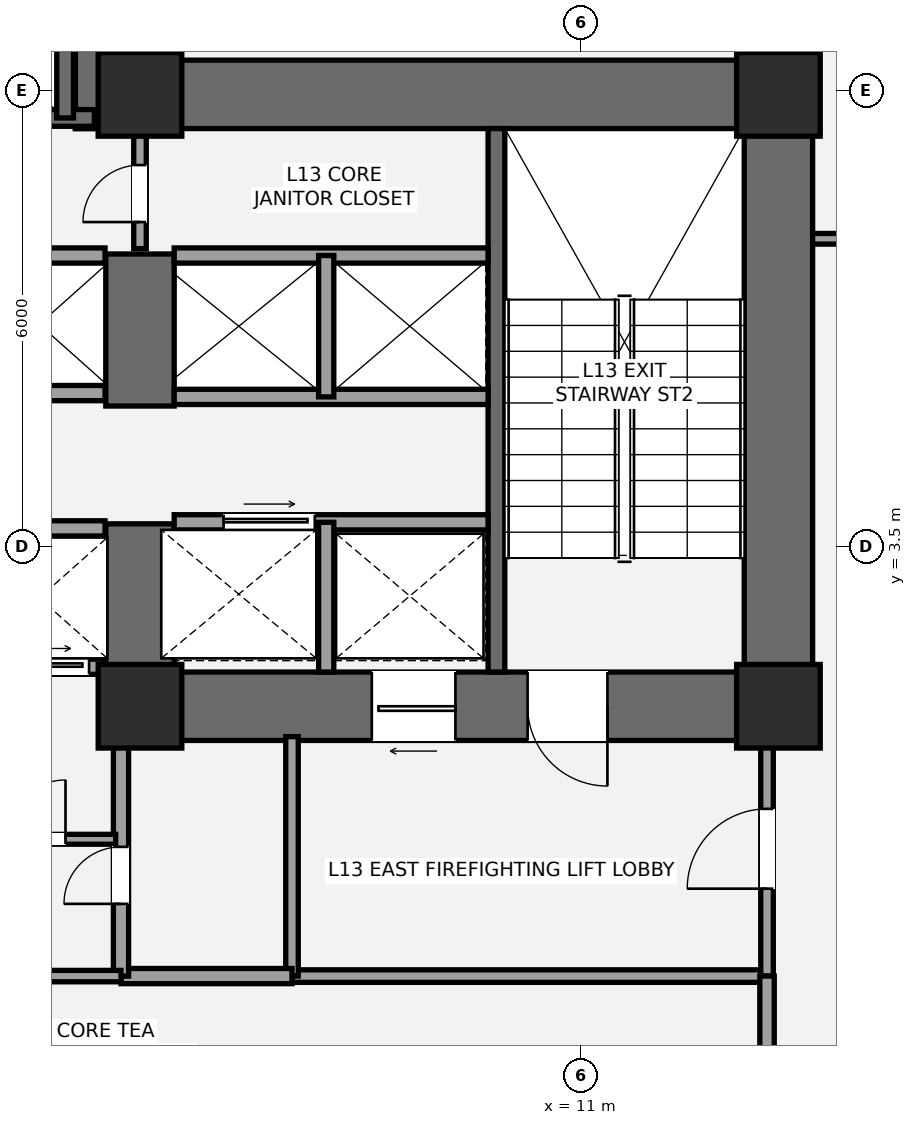
"""IFC4 building model, lengths in metres.
Left out: names, types, materials, properties, quantities, classifications, styles, units other than length and angle.
Written with IfcOpenShell. Run it as: python <this file> out.ifc"""

import sys

from ifc_helpers import new_model, si_unit, direction, frame, frame_2d, origin, origin_2d, place, context, subcontext, project, spatial, rectangle, extrude, element, fill, save


model = new_model("IFC4")
c1 = context("Model", 3, precision=1e-05, world=origin(), true_north=direction((0.0, 1.0)))
c2 = subcontext(c1, "Body", "Model", "MODEL_VIEW")
j1 = project(units=[si_unit("LENGTHUNIT", "METRE"), si_unit("PLANEANGLEUNIT", "RADIAN")], contexts=[c1])
p1 = place(None, origin())
s1 = spatial("IfcSite", under=j1, at=p1, CompositionType="ELEMENT")
p2 = place(p1, origin())
s2 = spatial("IfcBuilding", under=s1, at=p2, CompositionType="ELEMENT")
p3 = place(p2, frame((0.0, 0.0, 52.2)))
s3 = spatial("IfcBuildingStorey", under=s2, at=p3, CompositionType="ELEMENT", Elevation=52.2)
p4 = place(p3, frame((13.6, 0.95, 0.0), z_axis=(0.0, 0.0, 1.0), x_axis=(0.0, 1.0, 0.0)))
e1 = element("IfcWall", 1, at=p4, inside=s3, PredefinedType="SHEAR", context=c2, shape_type="SweptSolid", body=[
    extrude(rectangle(XDim=8.95, YDim=0.9, at=frame_2d((4.475, 0.0))), origin(), (0.0, 0.0, 1.0), 3.6),
])
p5 = place(p3, frame((4.35, 9.45, 0.0), z_axis=(0.0, 0.0, 1.0), x_axis=(1.0, 0.0, 0.0)))
e2 = element("IfcWall", 2, at=p5, inside=s3, PredefinedType="SHEAR", context=c2, shape_type="SweptSolid", body=[
    extrude(rectangle(XDim=9.7, YDim=0.9, at=frame_2d((4.85, 0.0))), origin(), (0.0, 0.0, 1.0), 3.6),
])
p6 = place(p3, frame((14.05, 1.4, 0.0), z_axis=(0.0, 0.0, 1.0), x_axis=(-1.0, 0.0, 0.0)))
e3 = element("IfcWall", 3, at=p6, inside=s3, PredefinedType="SHEAR", context=c2, shape_type="SweptSolid", body=[
    extrude(rectangle(XDim=9.3, YDim=0.9, at=frame_2d((4.65, 0.0))), origin(), (0.0, 0.0, 1.0), 3.6),
])
p7 = place(p6, frame((2.7, 0.0, 0.0)))
e4 = element("IfcOpeningElement", 4, at=p7, cuts=e3, PredefinedType="OPENING", context=c2, shape_type="SweptSolid", body=[
    extrude(rectangle(XDim=1.05, YDim=2.15, at=frame_2d((0.525, 1.075))), frame((0.0, 0.46, 0.0), z_axis=(0.0, -1.0, 0.0), x_axis=(1.0, 0.0, 0.0)), (0.0, 0.0, 1.0), 0.92),
])
p8 = place(p6, frame((4.7, 0.0, 0.0)))
e5 = element("IfcOpeningElement", 5, at=p8, cuts=e3, PredefinedType="OPENING", context=c2, shape_type="SweptSolid", body=[
    extrude(rectangle(XDim=1.1, YDim=2.2, at=frame_2d((0.55, 1.1))), frame((0.0, 0.46, 0.0), z_axis=(0.0, -1.0, 0.0), x_axis=(1.0, 0.0, 0.0)), (0.0, 0.0, 1.0), 0.92),
])
p9 = place(p3, frame((5.2, 0.95, 0.0), z_axis=(0.0, 0.0, 1.0), x_axis=(0.0, 1.0, 0.0)))
e6 = element("IfcWall", 6, at=p9, inside=s3, PredefinedType="SHEAR", context=c2, shape_type="SweptSolid", body=[
    extrude(rectangle(XDim=2.85, YDim=0.9, at=frame_2d((1.425, 0.0))), origin(), (0.0, 0.0, 1.0), 3.6),
])
p10 = place(p3, frame((5.2, 5.35, 0.0), z_axis=(0.0, 0.0, 1.0), x_axis=(0.0, 1.0, 0.0)))
e7 = element("IfcWall", 7, at=p10, inside=s3, PredefinedType="SHEAR", context=c2, shape_type="SweptSolid", body=[
    extrude(rectangle(XDim=2.0, YDim=0.9, at=frame_2d((1.0, 0.0))), origin(), (0.0, 0.0, 1.0), 3.6),
])
p11 = place(p3, frame((9.89, 1.85, 0.0), z_axis=(0.0, 0.0, 1.0), x_axis=(0.0, 1.0, 0.0)))
e8 = element("IfcWall", 8, at=p11, inside=s3, PredefinedType="SHEAR", context=c2, shape_type="SweptSolid", body=[
    extrude(rectangle(XDim=7.15, YDim=0.22, at=frame_2d((3.575, 0.0))), origin(), (0.0, 0.0, 1.0), 3.6),
])
p12 = place(p3, frame((4.8, 9.0, 0.0), z_axis=(0.0, 0.0, 1.0), x_axis=(0.0, 1.0, 0.0)))
e9 = element("IfcWall", 9, at=p12, inside=s3, PredefinedType="SHEAR", context=c2, shape_type="SweptSolid", body=[
    extrude(rectangle(XDim=4.3, YDim=0.9, at=frame_2d((2.15, 0.0))), origin(), (0.0, 0.0, 1.0), 3.6),
])
p13 = place(p3, frame((-4.7, 9.14, 0.0), z_axis=(0.0, 0.0, 1.0), x_axis=(1.0, 0.0, 0.0)))
e10 = element("IfcWall", 10, at=p13, inside=s3, PredefinedType="SHEAR", context=c2, shape_type="SweptSolid", body=[
    extrude(rectangle(XDim=9.3, YDim=0.22, at=frame_2d((4.65, 0.0))), origin(), (0.0, 0.0, 1.0), 3.6),
])
p14 = place(p13, frame((1.15, 0.0, 0.0)))
e11 = element("IfcOpeningElement", 11, at=p14, cuts=e10, PredefinedType="OPENING", context=c2, shape_type="SweptSolid", body=[
    extrude(rectangle(XDim=1.05, YDim=2.15, at=frame_2d((0.525, 1.075))), frame((0.0, 0.12, 0.0), z_axis=(0.0, -1.0, 0.0), x_axis=(1.0, 0.0, 0.0)), (0.0, 0.0, 1.0), 0.24),
])
p15 = place(p3, frame((4.215, 9.14, 0.0), z_axis=(0.0, 0.0, 1.0), x_axis=(0.0, 1.0, 0.0)))
e12 = element("IfcWall", 12, at=p15, inside=s3, PredefinedType="SHEAR", context=c2, shape_type="SweptSolid", body=[
    extrude(rectangle(XDim=3.26, YDim=0.22, at=frame_2d((1.63, 0.0))), origin(), (0.0, 0.0, 1.0), 3.6),
])
for number, where, z_axis, x_axis in (
    (13, (5.2, 1.4, 0.0), (0.0, 0.0, 1.0), (1.0, 0.0, 0.0)),
    (14, (5.2, 9.45, 0.0), (0.0, 0.0, 1.0), (1.0, 0.0, 0.0)),
    (15, (13.6, 1.4, 0.0), (0.0, 0.0, 1.0), (1.0, 0.0, 0.0)),
    (16, (13.6, 9.45, 0.0), (0.0, 0.0, 1.0), (1.0, 0.0, 0.0)),
):
    element("IfcColumn", number, at=place(p3, frame(where, z_axis=z_axis, x_axis=x_axis)), inside=s3, PredefinedType="COLUMN", context=c2, shape_type="SweptSolid", body=[
        extrude(rectangle(XDim=1.1, YDim=1.1, at=origin_2d()), origin(), (0.0, 0.0, 1.0), 3.6),
    ])
p16 = place(p3, frame((7.2, -2.15, 0.0), z_axis=(0.0, 0.0, 1.0), x_axis=(1.0, 0.0, 0.0)))
e17 = element("IfcWall", 17, at=p16, inside=s3, PredefinedType="PARTITIONING", context=c2, shape_type="SweptSolid", body=[
    extrude(rectangle(XDim=6.25, YDim=0.165, at=frame_2d((3.125, 0.0))), origin(), (0.0, 0.0, 1.0), 3.4),
])
p17 = place(p3, frame((7.2, -2.15, 0.0), z_axis=(0.0, 0.0, 1.0), x_axis=(0.0, 1.0, 0.0)))
e18 = element("IfcWall", 18, at=p17, inside=s3, PredefinedType="PARTITIONING", context=c2, shape_type="SweptSolid", body=[
    extrude(rectangle(XDim=3.15, YDim=0.165, at=frame_2d((1.575, 0.0))), origin(), (0.0, 0.0, 1.0), 2.853),
])
p18 = place(p3, frame((13.45, -2.15, 0.0), z_axis=(0.0, 0.0, 1.0), x_axis=(0.0, 1.0, 0.0)))
e19 = element("IfcWall", 19, at=p18, inside=s3, PredefinedType="PARTITIONING", context=c2, shape_type="SweptSolid", body=[
    extrude(rectangle(XDim=3.15, YDim=0.165, at=frame_2d((1.575, 0.0))), origin(), (0.0, 0.0, 1.0), 2.853),
])
p19 = place(p18, frame((1.15, 0.0, 0.0)))
e20 = element("IfcOpeningElement", 20, at=p19, cuts=e19, PredefinedType="OPENING", context=c2, shape_type="SweptSolid", body=[
    extrude(rectangle(XDim=1.05, YDim=2.15, at=frame_2d((0.525, 1.075))), frame((0.0, 0.093, 0.0), z_axis=(0.0, -1.0, 0.0), x_axis=(1.0, 0.0, 0.0)), (0.0, 0.0, 1.0), 0.185),
])
p20 = place(p3, frame((4.95, -2.15, 0.0), z_axis=(0.0, 0.0, 1.0), x_axis=(1.0, 0.0, 0.0)))
e21 = element("IfcWall", 21, at=p20, inside=s3, PredefinedType="SOLIDWALL", context=c2, shape_type="SweptSolid", body=[
    extrude(rectangle(XDim=2.25, YDim=0.2, at=frame_2d((1.125, 0.0))), origin(), (0.0, 0.0, 1.0), 3.4),
])
p21 = place(p3, frame((4.95, -2.15, 0.0), z_axis=(0.0, 0.0, 1.0), x_axis=(0.0, 1.0, 0.0)))
e22 = element("IfcWall", 22, at=p21, inside=s3, PredefinedType="SOLIDWALL", context=c2, shape_type="SweptSolid", body=[
    extrude(rectangle(XDim=3.15, YDim=0.2, at=frame_2d((1.575, 0.0))), origin(), (0.0, 0.0, 1.0), 2.853),
])
p22 = place(p21, frame((0.95, 0.0, 0.0)))
e23 = element("IfcOpeningElement", 23, at=p22, cuts=e22, PredefinedType="OPENING", context=c2, shape_type="SweptSolid", body=[
    extrude(rectangle(XDim=0.75, YDim=2.1, at=frame_2d((0.375, 1.05))), frame((0.0, 0.11, 0.0), z_axis=(0.0, -1.0, 0.0), x_axis=(1.0, 0.0, 0.0)), (0.0, 0.0, 1.0), 0.22),
])
p23 = place(p3, frame((2.89, -0.35, 0.0), z_axis=(0.0, 0.0, 1.0), x_axis=(1.0, 0.0, 0.0)))
e24 = element("IfcWall", 24, at=p23, inside=s3, PredefinedType="PARTITIONING", context=c2, shape_type="SweptSolid", body=[
    extrude(rectangle(XDim=1.99, YDim=0.13, at=frame_2d((0.995, 0.0))), origin(), (0.0, 0.0, 1.0), 3.4),
])
p24 = place(p23, frame((0.55, 0.0, 0.0)))
e25 = element("IfcOpeningElement", 25, at=p24, cuts=e24, PredefinedType="OPENING", context=c2, shape_type="SweptSolid", body=[
    extrude(rectangle(XDim=0.78, YDim=2.1, at=frame_2d((0.39, 1.05))), frame((0.0, 0.075, 0.0), z_axis=(0.0, -1.0, 0.0), x_axis=(1.0, 0.0, 0.0)), (0.0, 0.0, 1.0), 0.15),
])
p25 = place(p3, frame((5.65, 3.82, 0.0), z_axis=(0.0, 0.0, 1.0), x_axis=(1.0, 0.0, 0.0)))
e26 = element("IfcWall", 26, at=p25, inside=s3, PredefinedType="SOLIDWALL", context=c2, shape_type="SweptSolid", body=[
    extrude(rectangle(XDim=4.13, YDim=0.2, at=frame_2d((2.065, 0.0))), origin(), (0.0, 0.0, 1.0), 3.4),
])
p26 = place(p25, frame((0.65, 0.0, 0.0)))
e27 = element("IfcOpeningElement", 27, at=p26, cuts=e26, PredefinedType="OPENING", context=c2, shape_type="SweptSolid", body=[
    extrude(rectangle(XDim=1.2, YDim=2.2, at=frame_2d((0.6, 1.1))), frame((0.0, 0.11, 0.0), z_axis=(0.0, -1.0, 0.0), x_axis=(1.0, 0.0, 0.0)), (0.0, 0.0, 1.0), 0.22),
])
p27 = place(p3, frame((7.65, 1.85, 0.0), z_axis=(0.0, 0.0, 1.0), x_axis=(0.0, 1.0, 0.0)))
e28 = element("IfcWall", 28, at=p27, inside=s3, PredefinedType="SOLIDWALL", context=c2, shape_type="SweptSolid", body=[
    extrude(rectangle(XDim=1.97, YDim=0.2, at=frame_2d((0.985, 0.0))), origin(), (0.0, 0.0, 1.0), 3.4),
])
for number, where, z_axis, x_axis in (
    (29, (5.65, 5.47, 0.0), (0.0, 0.0, 1.0), (1.0, 0.0, 0.0)),
    (30, (5.65, 7.33, 0.0), (0.0, 0.0, 1.0), (1.0, 0.0, 0.0)),
):
    element("IfcWall", number, at=place(p3, frame(where, z_axis=z_axis, x_axis=x_axis)), inside=s3, PredefinedType="SOLIDWALL", context=c2, shape_type="SweptSolid", body=[
        extrude(rectangle(XDim=4.13, YDim=0.2, at=frame_2d((2.065, 0.0))), origin(), (0.0, 0.0, 1.0), 3.4),
    ])
p28 = place(p3, frame((7.65, 5.47, 0.0), z_axis=(0.0, 0.0, 1.0), x_axis=(0.0, 1.0, 0.0)))
e31 = element("IfcWall", 31, at=p28, inside=s3, PredefinedType="SOLIDWALL", context=c2, shape_type="SweptSolid", body=[
    extrude(rectangle(XDim=1.86, YDim=0.2, at=frame_2d((0.93, 0.0))), origin(), (0.0, 0.0, 1.0), 3.4),
])
p29 = place(p3, frame((0.88, 1.92, 0.0), z_axis=(0.0, 0.0, 1.0), x_axis=(1.0, 0.0, 0.0)))
e32 = element("IfcWall", 32, at=p29, inside=s3, PredefinedType="SOLIDWALL", context=c2, shape_type="SweptSolid", body=[
    extrude(rectangle(XDim=3.86, YDim=0.2, at=frame_2d((1.93, 0.0))), origin(), (0.0, 0.0, 1.0), 2.39),
])
p30 = place(p29, frame((0.55, 0.0, 0.0)))
e33 = element("IfcOpeningElement", 33, at=p30, cuts=e32, PredefinedType="OPENING", context=c2, shape_type="SweptSolid", body=[
    extrude(rectangle(XDim=1.1, YDim=2.2, at=frame_2d((0.55, 1.1))), frame((0.0, 0.11, 0.0), z_axis=(0.0, -1.0, 0.0), x_axis=(1.0, 0.0, 0.0)), (0.0, 0.0, 1.0), 0.22),
])
p31 = place(p29, frame((2.55, 0.0, 0.0)))
e34 = element("IfcOpeningElement", 34, at=p31, cuts=e32, PredefinedType="OPENING", context=c2, shape_type="SweptSolid", body=[
    extrude(rectangle(XDim=1.1, YDim=2.2, at=frame_2d((0.55, 1.1))), frame((0.0, 0.11, 0.0), z_axis=(0.0, -1.0, 0.0), x_axis=(1.0, 0.0, 0.0)), (0.0, 0.0, 1.0), 0.22),
])
for number, where, z_axis, x_axis in (
    (35, (0.88, 3.74, 0.0), (0.0, 0.0, 1.0), (1.0, 0.0, 0.0)),
    (36, (0.88, 5.52, 0.0), (0.0, 0.0, 1.0), (1.0, 0.0, 0.0)),
    (37, (0.88, 7.33, 0.0), (0.0, 0.0, 1.0), (1.0, 0.0, 0.0)),
):
    element("IfcWall", number, at=place(p3, frame(where, z_axis=z_axis, x_axis=x_axis)), inside=s3, PredefinedType="SOLIDWALL", context=c2, shape_type="SweptSolid", body=[
        extrude(rectangle(XDim=3.86, YDim=0.2, at=frame_2d((1.93, 0.0))), origin(), (0.0, 0.0, 1.0), 3.4),
    ])
p32 = place(p3, frame((5.2, 7.42, 0.0), z_axis=(0.0, 0.0, 1.0), x_axis=(0.0, 1.0, 0.0)))
e38 = element("IfcWall", 38, at=p32, inside=s3, PredefinedType="PARTITIONING", context=c2, shape_type="SweptSolid", body=[
    extrude(rectangle(XDim=1.58, YDim=0.165, at=frame_2d((0.79, 0.0))), origin(), (0.0, 0.0, 1.0), 3.4),
])
p33 = place(p32, frame((0.35, 0.0, 0.0)))
e39 = element("IfcOpeningElement", 39, at=p33, cuts=e38, PredefinedType="OPENING", context=c2, shape_type="SweptSolid", body=[
    extrude(rectangle(XDim=0.75, YDim=2.1, at=frame_2d((0.375, 1.05))), frame((0.0, 0.093, 0.0), z_axis=(0.0, -1.0, 0.0), x_axis=(1.0, 0.0, 0.0)), (0.0, 0.0, 1.0), 0.185),
])
p34 = place(p3, frame((2.1, -2.15, 0.0), z_axis=(0.0, 0.0, 1.0), x_axis=(1.0, 0.0, 0.0)))
e40 = element("IfcWall", 40, at=p34, inside=s3, PredefinedType="PLUMBINGWALL", context=c2, shape_type="SweptSolid", body=[
    extrude(rectangle(XDim=2.85, YDim=0.15, at=frame_2d((1.425, 0.0))), origin(), (0.0, 0.0, 1.0), 3.4),
])
p35 = place(p3, frame((13.45, -4.05, 0.0), z_axis=(0.0, 0.0, 1.0), x_axis=(0.0, 1.0, 0.0)))
e41 = element("IfcWall", 41, at=p35, inside=s3, PredefinedType="PLUMBINGWALL", context=c2, shape_type="SweptSolid", body=[
    extrude(rectangle(XDim=1.9, YDim=0.19, at=frame_2d((0.95, 0.0))), origin(), (0.0, 0.0, 1.0), 2.853),
])
p36 = place(p3, frame((14.05, 7.55, 0.0), z_axis=(0.0, 0.0, 1.0), x_axis=(1.0, 0.0, 0.0)))
e42 = element("IfcWall", 42, at=p36, inside=s3, PredefinedType="PARTITIONING", context=c2, shape_type="SweptSolid", body=[
    extrude(rectangle(XDim=10.806, YDim=0.14, at=frame_2d((5.403, 0.0))), origin(), (0.0, 0.0, 1.0), 2.853),
])
p37 = place(p36, frame((1.2, 0.0, 0.0)))
e43 = element("IfcOpeningElement", 43, at=p37, cuts=e42, PredefinedType="OPENING", context=c2, shape_type="SweptSolid", body=[
    extrude(rectangle(XDim=0.92, YDim=2.15, at=frame_2d((0.46, 1.075))), frame((0.0, 0.08, 0.0), z_axis=(0.0, -1.0, 0.0), x_axis=(1.0, 0.0, 0.0)), (0.0, 0.0, 1.0), 0.16),
])
p38 = place(p7, origin())
e44 = element("IfcDoor", 44, at=p38, inside=s3, OperationType="SINGLE_SWING_LEFT", PredefinedType="DOOR", context=c2, shape_type="SweptSolid", body=[
    extrude(rectangle(XDim=1.05, YDim=2.15, at=frame_2d((0.525, 1.075))), frame((0.0, 0.025, 0.0), z_axis=(0.0, -1.0, 0.0), x_axis=(1.0, 0.0, 0.0)), (0.0, 0.0, 1.0), 0.05),
])
fill(e4, e44)
p39 = place(p19, origin())
e45 = element("IfcDoor", 45, at=p39, inside=s3, OperationType="SINGLE_SWING_LEFT", PredefinedType="DOOR", context=c2, shape_type="SweptSolid", body=[
    extrude(rectangle(XDim=1.05, YDim=2.15, at=frame_2d((0.525, 1.075))), frame((0.0, 0.025, 0.0), z_axis=(0.0, -1.0, 0.0), x_axis=(1.0, 0.0, 0.0)), (0.0, 0.0, 1.0), 0.05),
])
fill(e20, e45)
p40 = place(p22, origin())
e46 = element("IfcDoor", 46, at=p40, inside=s3, OperationType="SINGLE_SWING_LEFT", PredefinedType="DOOR", context=c2, shape_type="SweptSolid", body=[
    extrude(rectangle(XDim=0.75, YDim=2.1, at=frame_2d((0.375, 1.05))), frame((0.0, 0.025, 0.0), z_axis=(0.0, -1.0, 0.0), x_axis=(1.0, 0.0, 0.0)), (0.0, 0.0, 1.0), 0.05),
])
fill(e23, e46)
p41 = place(p24, origin())
e47 = element("IfcDoor", 47, at=p41, inside=s3, OperationType="SINGLE_SWING_RIGHT", PredefinedType="DOOR", context=c2, shape_type="SweptSolid", body=[
    extrude(rectangle(XDim=0.78, YDim=2.1, at=frame_2d((0.39, 1.05))), frame((0.0, 0.025, 0.0), z_axis=(0.0, -1.0, 0.0), x_axis=(1.0, 0.0, 0.0)), (0.0, 0.0, 1.0), 0.05),
])
fill(e25, e47)
p42 = place(p8, origin())
e48 = element("IfcDoor", 48, at=p42, inside=s3, OperationType="SLIDING_TO_LEFT", PredefinedType="DOOR", context=c2, shape_type="SweptSolid", body=[
    extrude(rectangle(XDim=1.1, YDim=2.2, at=frame_2d((0.55, 1.1))), frame((0.0, 0.025, 0.0), z_axis=(0.0, -1.0, 0.0), x_axis=(1.0, 0.0, 0.0)), (0.0, 0.0, 1.0), 0.05),
])
fill(e5, e48)
p43 = place(p26, origin())
e49 = element("IfcDoor", 49, at=p43, inside=s3, OperationType="SLIDING_TO_RIGHT", PredefinedType="DOOR", context=c2, shape_type="SweptSolid", body=[
    extrude(rectangle(XDim=1.2, YDim=2.2, at=frame_2d((0.6, 1.1))), frame((0.0, 0.025, 0.0), z_axis=(0.0, -1.0, 0.0), x_axis=(1.0, 0.0, 0.0)), (0.0, 0.0, 1.0), 0.05),
])
fill(e27, e49)
p44 = place(p31, origin())
e50 = element("IfcDoor", 50, at=p44, inside=s3, OperationType="SLIDING_TO_LEFT", PredefinedType="DOOR", context=c2, shape_type="SweptSolid", body=[
    extrude(rectangle(XDim=1.1, YDim=2.2, at=frame_2d((0.55, 1.1))), frame((0.0, 0.025, 0.0), z_axis=(0.0, -1.0, 0.0), x_axis=(1.0, 0.0, 0.0)), (0.0, 0.0, 1.0), 0.05),
])
fill(e34, e50)
p45 = place(p33, origin())
e51 = element("IfcDoor", 51, at=p45, inside=s3, OperationType="SINGLE_SWING_LEFT", PredefinedType="DOOR", context=c2, shape_type="SweptSolid", body=[
    extrude(rectangle(XDim=0.75, YDim=2.1, at=frame_2d((0.375, 1.05))), frame((0.0, 0.025, 0.0), z_axis=(0.0, -1.0, 0.0), x_axis=(1.0, 0.0, 0.0)), (0.0, 0.0, 1.0), 0.05),
])
fill(e39, e51)
save(model, sys.argv[1])
